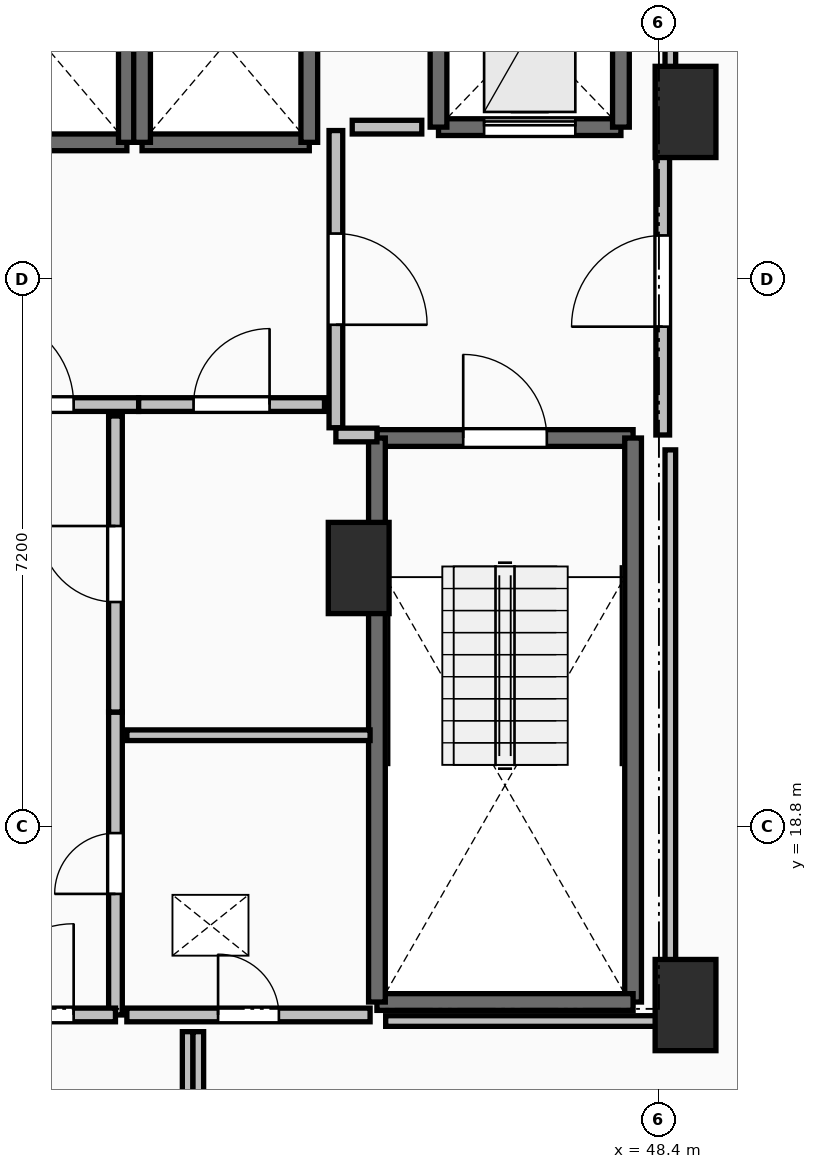
"""IFC4 building model, lengths in metres.
Left out: names, types, materials, properties, quantities, classifications, styles, units other than length and angle.
Written with IfcOpenShell. Run it as: python <this file> out.ifc"""

import sys

from ifc_helpers import new_model, si_unit, direction, frame, frame_2d, origin, origin_2d, place, context, subcontext, project, spatial, rectangle, extrude, element, fill, save


model = new_model("IFC4")
c1 = context("Model", 3, precision=1e-05, world=origin(), true_north=direction((0.0, 1.0)))
c2 = subcontext(c1, "Body", "Model", "MODEL_VIEW")
j1 = project(units=[si_unit("LENGTHUNIT", "METRE"), si_unit("PLANEANGLEUNIT", "RADIAN")], contexts=[c1])
p1 = place(None, origin())
s1 = spatial("IfcSite", under=j1, at=p1, CompositionType="ELEMENT")
p2 = place(p1, origin())
s2 = spatial("IfcBuilding", under=s1, at=p2, CompositionType="ELEMENT")
p3 = place(p2, frame((0.0, 0.0, 157.1)))
s3 = spatial("IfcBuildingStorey", under=s2, at=p3, CompositionType="ELEMENT", Elevation=157.1)
for number, where, z_axis, x_axis in (
    (1, (48.75, 28.2, 0.0), (0.0, 0.0, 1.0), (1.0, 0.0, 0.0)),
    (2, (48.75, 16.45, 0.0), (0.0, 0.0, 1.0), (1.0, 0.0, 0.0)),
    (3, (44.45, 22.2, 0.0), (0.0, 0.0, 1.0), (1.0, 0.0, 0.0)),
):
    element("IfcColumn", number, at=place(p3, frame(where, z_axis=z_axis, x_axis=x_axis)), inside=s3, PredefinedType="PILASTER", context=c2, shape_type="SweptSolid", body=[
        extrude(rectangle(XDim=0.8, YDim=1.2, at=origin_2d()), origin(), (0.0, 0.0, 1.0), 3.5),
    ])
p4 = place(p3, frame((44.69, 23.91, 0.0), z_axis=(0.0, 0.0, 1.0), x_axis=(1.0, 0.0, 0.0)))
e4 = element("IfcWall", 4, at=p4, inside=s3, PredefinedType="SOLIDWALL", context=c2, shape_type="SweptSolid", body=[
    extrude(rectangle(XDim=3.37, YDim=0.22, at=frame_2d((1.685, 0.0))), origin(), (0.0, 0.0, 1.0), 3.24),
])
p5 = place(p4, frame((1.135, 0.0, 0.0)))
e5 = element("IfcOpeningElement", 5, at=p5, cuts=e4, PredefinedType="OPENING", context=c2, shape_type="SweptSolid", body=[
    extrude(rectangle(XDim=1.1, YDim=2.15, at=frame_2d((0.55, 1.075))), frame((0.0, 0.125, 0.0), z_axis=(0.0, -1.0, 0.0), x_axis=(1.0, 0.0, 0.0)), (0.0, 0.0, 1.0), 0.25),
])
p6 = place(p3, frame((48.06, 23.91, 0.0), z_axis=(0.0, 0.0, 1.0), x_axis=(0.0, -1.0, 0.0)))
e6 = element("IfcWall", 6, at=p6, inside=s3, PredefinedType="SOLIDWALL", context=c2, shape_type="SweptSolid", body=[
    extrude(rectangle(XDim=7.42, YDim=0.22, at=frame_2d((3.71, 0.0))), origin(), (0.0, 0.0, 1.0), 3.24),
])
p7 = place(p3, frame((48.06, 16.49, 0.0), z_axis=(0.0, 0.0, 1.0), x_axis=(-1.0, 0.0, 0.0)))
e7 = element("IfcWall", 7, at=p7, inside=s3, PredefinedType="SOLIDWALL", context=c2, shape_type="SweptSolid", body=[
    extrude(rectangle(XDim=3.37, YDim=0.22, at=frame_2d((1.685, 0.0))), origin(), (0.0, 0.0, 1.0), 3.24),
])
p8 = place(p3, frame((44.69, 16.49, 0.0), z_axis=(0.0, 0.0, 1.0), x_axis=(0.0, 1.0, 0.0)))
e8 = element("IfcWall", 8, at=p8, inside=s3, PredefinedType="SOLIDWALL", context=c2, shape_type="SweptSolid", body=[
    extrude(rectangle(XDim=7.42, YDim=0.22, at=frame_2d((3.71, 0.0))), origin(), (0.0, 0.0, 1.0), 3.24),
])
p9 = place(p3, frame((39.2, 27.8, 0.0), z_axis=(0.0, 0.0, 1.0), x_axis=(1.0, 0.0, 0.0)))
e9 = element("IfcWall", 9, at=p9, inside=s3, PredefinedType="SOLIDWALL", context=c2, shape_type="SweptSolid", body=[
    extrude(rectangle(XDim=2.2, YDim=0.22, at=frame_2d((1.1, 0.0))), origin(), (0.0, 0.0, 1.0), 3.24),
])
p10 = place(p3, frame((41.4, 27.8, 0.0), z_axis=(0.0, 0.0, 1.0), x_axis=(0.0, 1.0, 0.0)))
e10 = element("IfcWall", 10, at=p10, inside=s3, PredefinedType="SOLIDWALL", context=c2, shape_type="SweptSolid", body=[
    extrude(rectangle(XDim=2.6, YDim=0.22, at=frame_2d((1.3, 0.0))), origin(), (0.0, 0.0, 1.0), 3.24),
])
p11 = place(p3, frame((41.6, 27.8, 0.0), z_axis=(0.0, 0.0, 1.0), x_axis=(1.0, 0.0, 0.0)))
e11 = element("IfcWall", 11, at=p11, inside=s3, PredefinedType="SOLIDWALL", context=c2, shape_type="SweptSolid", body=[
    extrude(rectangle(XDim=2.2, YDim=0.22, at=frame_2d((1.1, 0.0))), origin(), (0.0, 0.0, 1.0), 3.24),
])
for number, where, z_axis, x_axis in (
    (12, (43.8, 27.8, 0.0), (0.0, 0.0, 1.0), (0.0, 1.0, 0.0)),
    (13, (41.6, 30.4, 0.0), (0.0, 0.0, 1.0), (0.0, -1.0, 0.0)),
):
    element("IfcWall", number, at=place(p3, frame(where, z_axis=z_axis, x_axis=x_axis)), inside=s3, PredefinedType="SOLIDWALL", context=c2, shape_type="SweptSolid", body=[
        extrude(rectangle(XDim=2.6, YDim=0.22, at=frame_2d((1.3, 0.0))), origin(), (0.0, 0.0, 1.0), 3.24),
    ])
p12 = place(p3, frame((45.5, 28.0, 0.0), z_axis=(0.0, 0.0, 1.0), x_axis=(1.0, 0.0, 0.0)))
e14 = element("IfcWall", 14, at=p12, inside=s3, PredefinedType="SHEAR", context=c2, shape_type="SweptSolid", body=[
    extrude(rectangle(XDim=2.4, YDim=0.22, at=frame_2d((1.2, 0.0))), origin(), (0.0, 0.0, 1.0), 3.24),
])
p13 = place(p12, frame((0.6, 0.0, 0.0)))
e15 = element("IfcOpeningElement", 15, at=p13, cuts=e14, PredefinedType="OPENING", context=c2, shape_type="SweptSolid", body=[
    extrude(rectangle(XDim=1.2, YDim=2.2, at=frame_2d((0.6, 1.1))), frame((0.0, 0.125, 0.0), z_axis=(0.0, -1.0, 0.0), x_axis=(1.0, 0.0, 0.0)), (0.0, 0.0, 1.0), 0.25),
])
for number, where, z_axis, x_axis in (
    (16, (47.9, 28.0, 0.0), (0.0, 0.0, 1.0), (0.0, 1.0, 0.0)),
    (17, (45.5, 30.5, 0.0), (0.0, 0.0, 1.0), (0.0, -1.0, 0.0)),
):
    element("IfcWall", number, at=place(p3, frame(where, z_axis=z_axis, x_axis=x_axis)), inside=s3, PredefinedType="SHEAR", context=c2, shape_type="SweptSolid", body=[
        extrude(rectangle(XDim=2.5, YDim=0.22, at=frame_2d((1.25, 0.0))), origin(), (0.0, 0.0, 1.0), 3.24),
    ])
p14 = place(p3, frame((44.15, 27.955, 0.0), z_axis=(0.0, 0.0, 1.0), x_axis=(0.0, -1.0, 0.0)))
e18 = element("IfcWall", 18, at=p14, inside=s3, PredefinedType="PARTITIONING", context=c2, shape_type="SweptSolid", body=[
    extrude(rectangle(XDim=3.91, YDim=0.18, at=frame_2d((1.955, 0.0))), origin(), (0.0, 0.0, 1.0), 3.24),
])
p15 = place(p14, frame((1.355, 0.0, 0.0)))
e19 = element("IfcOpeningElement", 19, at=p15, cuts=e18, PredefinedType="OPENING", context=c2, shape_type="SweptSolid", body=[
    extrude(rectangle(XDim=1.2, YDim=2.15, at=frame_2d((0.6, 1.075))), frame((0.0, 0.105, 0.0), z_axis=(0.0, -1.0, 0.0), x_axis=(1.0, 0.0, 0.0)), (0.0, 0.0, 1.0), 0.21),
])
p16 = place(p3, frame((44.15, 23.95, 0.0), z_axis=(0.0, 0.0, 1.0), x_axis=(1.0, 0.0, 0.0)))
e20 = element("IfcWall", 20, at=p16, inside=s3, PredefinedType="PARTITIONING", context=c2, shape_type="SweptSolid", body=[
    extrude(rectangle(XDim=0.54, YDim=0.18, at=frame_2d((0.27, 0.0))), origin(), (0.0, 0.0, 1.0), 3.24),
])
p17 = place(p3, frame((48.45, 23.95, 0.0), z_axis=(0.0, 0.0, 1.0), x_axis=(0.0, 1.0, 0.0)))
e21 = element("IfcWall", 21, at=p17, inside=s3, PredefinedType="PARTITIONING", context=c2, shape_type="SweptSolid", body=[
    extrude(rectangle(XDim=4.05, YDim=0.18, at=frame_2d((2.025, 0.0))), origin(), (0.0, 0.0, 1.0), 3.24),
])
p18 = place(p17, frame((1.425, 0.0, 0.0)))
e22 = element("IfcOpeningElement", 22, at=p18, cuts=e21, PredefinedType="OPENING", context=c2, shape_type="SweptSolid", body=[
    extrude(rectangle(XDim=1.2, YDim=2.15, at=frame_2d((0.6, 1.075))), frame((0.0, 0.105, 0.0), z_axis=(0.0, -1.0, 0.0), x_axis=(1.0, 0.0, 0.0)), (0.0, 0.0, 1.0), 0.21),
])
p19 = place(p3, frame((38.645, 24.35, 0.0), z_axis=(0.0, 0.0, 1.0), x_axis=(1.0, 0.0, 0.0)))
e23 = element("IfcWall", 23, at=p19, inside=s3, PredefinedType="PARTITIONING", context=c2, shape_type="SweptSolid", body=[
    extrude(rectangle(XDim=2.91, YDim=0.18, at=frame_2d((1.455, 0.0))), origin(), (0.0, 0.0, 1.0), 3.24),
])
p20 = place(p19, frame((0.855, 0.0, 0.0)))
e24 = element("IfcOpeningElement", 24, at=p20, cuts=e23, PredefinedType="OPENING", context=c2, shape_type="SweptSolid", body=[
    extrude(rectangle(XDim=1.2, YDim=2.15, at=frame_2d((0.6, 1.075))), frame((0.0, 0.105, 0.0), z_axis=(0.0, -1.0, 0.0), x_axis=(1.0, 0.0, 0.0)), (0.0, 0.0, 1.0), 0.21),
])
p21 = place(p3, frame((41.555, 24.35, 0.0), z_axis=(0.0, 0.0, 1.0), x_axis=(1.0, 0.0, 0.0)))
e25 = element("IfcWall", 25, at=p21, inside=s3, PredefinedType="PARTITIONING", context=c2, shape_type="SweptSolid", body=[
    extrude(rectangle(XDim=2.445, YDim=0.18, at=frame_2d((1.223, 0.0))), origin(), (0.0, 0.0, 1.0), 3.24),
])
p22 = place(p21, frame((0.722, 0.0, 0.0)))
e26 = element("IfcOpeningElement", 26, at=p22, cuts=e25, PredefinedType="OPENING", context=c2, shape_type="SweptSolid", body=[
    extrude(rectangle(XDim=1.0, YDim=2.15, at=frame_2d((0.5, 1.075))), frame((0.0, 0.105, 0.0), z_axis=(0.0, -1.0, 0.0), x_axis=(1.0, 0.0, 0.0)), (0.0, 0.0, 1.0), 0.21),
])
p23 = place(p3, frame((41.25, 16.32, 0.0), z_axis=(0.0, 0.0, 1.0), x_axis=(0.0, 1.0, 0.0)))
e27 = element("IfcWall", 27, at=p23, inside=s3, PredefinedType="PARTITIONING", context=c2, shape_type="SweptSolid", body=[
    extrude(rectangle(XDim=3.985, YDim=0.18, at=frame_2d((1.992, 0.0))), origin(), (0.0, 0.0, 1.0), 3.24),
])
p24 = place(p23, frame((1.593, 0.0, 0.0)))
e28 = element("IfcOpeningElement", 28, at=p24, cuts=e27, PredefinedType="OPENING", context=c2, shape_type="SweptSolid", body=[
    extrude(rectangle(XDim=0.8, YDim=2.05, at=frame_2d((0.4, 1.025))), frame((0.0, 0.105, 0.0), z_axis=(0.0, -1.0, 0.0), x_axis=(1.0, 0.0, 0.0)), (0.0, 0.0, 1.0), 0.21),
])
p25 = place(p3, frame((41.25, 20.305, 0.0), z_axis=(0.0, 0.0, 1.0), x_axis=(0.0, 1.0, 0.0)))
e29 = element("IfcWall", 29, at=p25, inside=s3, PredefinedType="PARTITIONING", context=c2, shape_type="SweptSolid", body=[
    extrude(rectangle(XDim=3.895, YDim=0.18, at=frame_2d((1.948, 0.0))), origin(), (0.0, 0.0, 1.0), 3.24),
])
p26 = place(p25, frame((1.448, 0.0, 0.0)))
e30 = element("IfcOpeningElement", 30, at=p26, cuts=e29, PredefinedType="OPENING", context=c2, shape_type="SweptSolid", body=[
    extrude(rectangle(XDim=1.0, YDim=2.15, at=frame_2d((0.5, 1.075))), frame((0.0, 0.105, 0.0), z_axis=(0.0, -1.0, 0.0), x_axis=(1.0, 0.0, 0.0)), (0.0, 0.0, 1.0), 0.21),
])
p27 = place(p3, frame((38.95, 16.32, 0.0), z_axis=(0.0, 0.0, 1.0), x_axis=(1.0, 0.0, 0.0)))
e31 = element("IfcWall", 31, at=p27, inside=s3, PredefinedType="PARTITIONING", context=c2, shape_type="SweptSolid", body=[
    extrude(rectangle(XDim=2.3, YDim=0.18, at=frame_2d((1.15, 0.0))), origin(), (0.0, 0.0, 1.0), 3.24),
])
p28 = place(p27, frame((0.55, 0.0, 0.0)))
e32 = element("IfcOpeningElement", 32, at=p28, cuts=e31, PredefinedType="OPENING", context=c2, shape_type="SweptSolid", body=[
    extrude(rectangle(XDim=1.2, YDim=2.15, at=frame_2d((0.6, 1.075))), frame((0.0, 0.105, 0.0), z_axis=(0.0, -1.0, 0.0), x_axis=(1.0, 0.0, 0.0)), (0.0, 0.0, 1.0), 0.21),
])
p29 = place(p3, frame((44.6, 20.0, 0.0), z_axis=(0.0, 0.0, 1.0), x_axis=(-1.0, 0.0, 0.0)))
e33 = element("IfcWall", 33, at=p29, inside=s3, PredefinedType="PARTITIONING", context=c2, shape_type="SweptSolid", body=[
    extrude(rectangle(XDim=3.2, YDim=0.14, at=frame_2d((1.6, 0.0))), origin(), (0.0, 0.0, 1.0), 3.24),
])
p30 = place(p3, frame((41.4, 16.32, 0.0), z_axis=(0.0, 0.0, 1.0), x_axis=(1.0, 0.0, 0.0)))
e34 = element("IfcWall", 34, at=p30, inside=s3, PredefinedType="PARTITIONING", context=c2, shape_type="SweptSolid", body=[
    extrude(rectangle(XDim=3.2, YDim=0.18, at=frame_2d((1.6, 0.0))), origin(), (0.0, 0.0, 1.0), 3.24),
])
p31 = place(p30, frame((1.2, 0.0, 0.0)))
e35 = element("IfcOpeningElement", 35, at=p31, cuts=e34, PredefinedType="OPENING", context=c2, shape_type="SweptSolid", body=[
    extrude(rectangle(XDim=0.8, YDim=2.05, at=frame_2d((0.4, 1.025))), frame((0.0, 0.105, 0.0), z_axis=(0.0, -1.0, 0.0), x_axis=(1.0, 0.0, 0.0)), (0.0, 0.0, 1.0), 0.21),
])
p32 = place(p3, frame((45.28, 28.0, 0.0), z_axis=(0.0, 0.0, 1.0), x_axis=(-1.0, 0.0, 0.0)))
e36 = element("IfcWall", 36, at=p32, inside=s3, PredefinedType="PARTITIONING", context=c2, shape_type="SweptSolid", body=[
    extrude(rectangle(XDim=0.915, YDim=0.18, at=frame_2d((0.458, 0.0))), origin(), (0.0, 0.0, 1.0), 3.24),
])
p33 = place(p3, frame((48.55, 28.196, 0.0), z_axis=(0.0, 0.0, 1.0), x_axis=(0.0, 1.0, 0.0)))
e37 = element("IfcWall", 37, at=p33, inside=s3, PredefinedType="PARTITIONING", context=c2, shape_type="SweptSolid", body=[
    extrude(rectangle(XDim=5.254, YDim=0.14, at=frame_2d((2.627, 0.0))), origin(), (0.0, 0.0, 1.0), 2.432),
])
for number, where, z_axis, x_axis in (
    (38, (42.2, 16.1, 0.0), (0.0, 0.0, 1.0), (0.0, -1.0, 0.0)),
    (39, (42.34, 14.27, 0.0), (0.0, 0.0, 1.0), (0.0, 1.0, 0.0)),
):
    element("IfcWall", number, at=place(p3, frame(where, z_axis=z_axis, x_axis=x_axis)), inside=s3, PredefinedType="PARTITIONING", context=c2, shape_type="SweptSolid", body=[
        extrude(rectangle(XDim=1.83, YDim=0.14, at=frame_2d((0.915, 0.0))), origin(), (0.0, 0.0, 1.0), 2.886),
    ])
p34 = place(p3, frame((44.805, 16.24, 0.0), z_axis=(0.0, 0.0, 1.0), x_axis=(1.0, 0.0, 0.0)))
e40 = element("IfcWall", 40, at=p34, inside=s3, PredefinedType="PARTITIONING", context=c2, shape_type="SweptSolid", body=[
    extrude(rectangle(XDim=3.745, YDim=0.14, at=frame_2d((1.873, 0.0))), origin(), (0.0, 0.0, 1.0), 2.432),
])
p35 = place(p3, frame((48.55, 16.24, 0.0), z_axis=(0.0, 0.0, 1.0), x_axis=(0.0, 1.0, 0.0)))
e41 = element("IfcWall", 41, at=p35, inside=s3, PredefinedType="PARTITIONING", context=c2, shape_type="SweptSolid", body=[
    extrude(rectangle(XDim=7.514, YDim=0.14, at=frame_2d((3.757, 0.0))), origin(), (0.0, 0.0, 1.0), 2.432),
])
p36 = place(p5, origin())
e42 = element("IfcDoor", 42, at=p36, inside=s3, OperationType="SINGLE_SWING_LEFT", PredefinedType="DOOR", context=c2, shape_type="SweptSolid", body=[
    extrude(rectangle(XDim=1.1, YDim=2.15, at=frame_2d((0.55, 1.075))), frame((0.0, 0.025, 0.0), z_axis=(0.0, -1.0, 0.0), x_axis=(1.0, 0.0, 0.0)), (0.0, 0.0, 1.0), 0.05),
])
fill(e5, e42)
p37 = place(p13, origin())
e43 = element("IfcDoor", 43, at=p37, inside=s3, OperationType="SLIDING_TO_LEFT", PredefinedType="DOOR", context=c2, shape_type="SweptSolid", body=[
    extrude(rectangle(XDim=1.2, YDim=2.2, at=frame_2d((0.6, 1.1))), frame((0.0, 0.025, 0.0), z_axis=(0.0, -1.0, 0.0), x_axis=(1.0, 0.0, 0.0)), (0.0, 0.0, 1.0), 0.05),
])
fill(e15, e43)
p38 = place(p15, origin())
e44 = element("IfcDoor", 44, at=p38, inside=s3, OperationType="SINGLE_SWING_RIGHT", PredefinedType="DOOR", context=c2, shape_type="SweptSolid", body=[
    extrude(rectangle(XDim=1.2, YDim=2.15, at=frame_2d((0.6, 1.075))), frame((0.0, 0.025, 0.0), z_axis=(0.0, -1.0, 0.0), x_axis=(1.0, 0.0, 0.0)), (0.0, 0.0, 1.0), 0.05),
])
fill(e19, e44)
p39 = place(p18, origin())
e45 = element("IfcDoor", 45, at=p39, inside=s3, OperationType="SINGLE_SWING_LEFT", PredefinedType="DOOR", context=c2, shape_type="SweptSolid", body=[
    extrude(rectangle(XDim=1.2, YDim=2.15, at=frame_2d((0.6, 1.075))), frame((0.0, 0.025, 0.0), z_axis=(0.0, -1.0, 0.0), x_axis=(1.0, 0.0, 0.0)), (0.0, 0.0, 1.0), 0.05),
])
fill(e22, e45)
p40 = place(p20, origin())
e46 = element("IfcDoor", 46, at=p40, inside=s3, OperationType="SINGLE_SWING_LEFT", PredefinedType="DOOR", context=c2, shape_type="SweptSolid", body=[
    extrude(rectangle(XDim=1.2, YDim=2.15, at=frame_2d((0.6, 1.075))), frame((0.0, 0.025, 0.0), z_axis=(0.0, -1.0, 0.0), x_axis=(1.0, 0.0, 0.0)), (0.0, 0.0, 1.0), 0.05),
])
fill(e24, e46)
p41 = place(p22, origin())
e47 = element("IfcDoor", 47, at=p41, inside=s3, OperationType="SINGLE_SWING_RIGHT", PredefinedType="DOOR", context=c2, shape_type="SweptSolid", body=[
    extrude(rectangle(XDim=1.0, YDim=2.15, at=frame_2d((0.5, 1.075))), frame((0.0, 0.025, 0.0), z_axis=(0.0, -1.0, 0.0), x_axis=(1.0, 0.0, 0.0)), (0.0, 0.0, 1.0), 0.05),
])
fill(e26, e47)
p42 = place(p24, origin())
e48 = element("IfcDoor", 48, at=p42, inside=s3, OperationType="SINGLE_SWING_LEFT", PredefinedType="DOOR", context=c2, shape_type="SweptSolid", body=[
    extrude(rectangle(XDim=0.8, YDim=2.05, at=frame_2d((0.4, 1.025))), frame((0.0, 0.025, 0.0), z_axis=(0.0, -1.0, 0.0), x_axis=(1.0, 0.0, 0.0)), (0.0, 0.0, 1.0), 0.05),
])
fill(e28, e48)
p43 = place(p26, origin())
e49 = element("IfcDoor", 49, at=p43, inside=s3, OperationType="SINGLE_SWING_RIGHT", PredefinedType="DOOR", context=c2, shape_type="SweptSolid", body=[
    extrude(rectangle(XDim=1.0, YDim=2.15, at=frame_2d((0.5, 1.075))), frame((0.0, 0.025, 0.0), z_axis=(0.0, -1.0, 0.0), x_axis=(1.0, 0.0, 0.0)), (0.0, 0.0, 1.0), 0.05),
])
fill(e30, e49)
p44 = place(p28, origin())
e50 = element("IfcDoor", 50, at=p44, inside=s3, OperationType="SINGLE_SWING_RIGHT", PredefinedType="DOOR", context=c2, shape_type="SweptSolid", body=[
    extrude(rectangle(XDim=1.2, YDim=2.15, at=frame_2d((0.6, 1.075))), frame((0.0, 0.025, 0.0), z_axis=(0.0, -1.0, 0.0), x_axis=(1.0, 0.0, 0.0)), (0.0, 0.0, 1.0), 0.05),
])
fill(e32, e50)
p45 = place(p31, origin())
e51 = element("IfcDoor", 51, at=p45, inside=s3, OperationType="SINGLE_SWING_LEFT", PredefinedType="DOOR", context=c2, shape_type="SweptSolid", body=[
    extrude(rectangle(XDim=0.8, YDim=2.05, at=frame_2d((0.4, 1.025))), frame((0.0, 0.025, 0.0), z_axis=(0.0, -1.0, 0.0), x_axis=(1.0, 0.0, 0.0)), (0.0, 0.0, 1.0), 0.05),
])
fill(e35, e51)
save(model, sys.argv[1])
